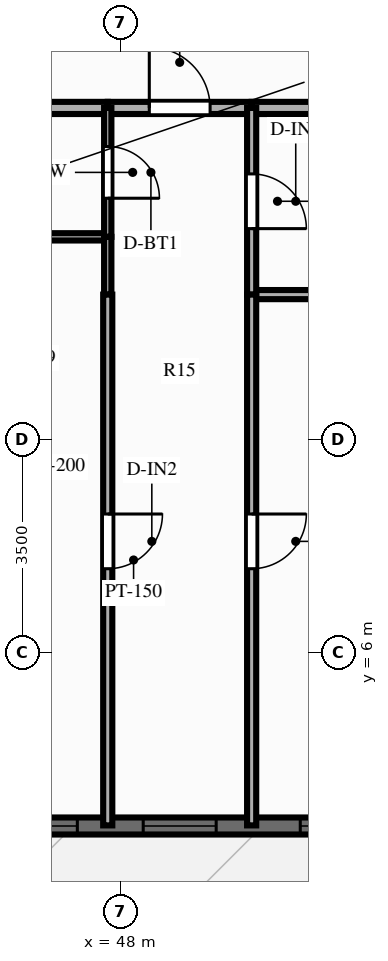
"""IFC4 building model, lengths in metres.
Left out: names, types, materials, properties, quantities, classifications, styles, units other than length and angle.
Written with IfcOpenShell. Run it as: python <this file> out.ifc"""

import sys

from ifc_helpers import new_model, si_unit, direction, frame, frame_2d, origin, place, context, subcontext, project, spatial, rectangle, extrude, source, transform, mapped, element, fill, save


model = new_model("IFC4")
c1 = context("Model", 3, precision=1e-05, world=origin(), true_north=direction((0.0, 1.0)))
c2 = subcontext(c1, "Body", "Model", "MODEL_VIEW")
j1 = project(units=[si_unit("LENGTHUNIT", "METRE"), si_unit("PLANEANGLEUNIT", "RADIAN")], contexts=[c1])
p1 = place(None, origin())
s1 = spatial("IfcSite", under=j1, at=p1, CompositionType="ELEMENT")
p2 = place(p1, origin())
s2 = spatial("IfcBuilding", under=s1, at=p2, CompositionType="ELEMENT")
p3 = place(p2, frame((0.0, 0.0, 19.4)))
s3 = spatial("IfcBuildingStorey", under=s2, at=p3, CompositionType="ELEMENT", Elevation=19.4)
p4 = place(p3, frame((15.5, 3.14, 0.0), z_axis=(0.0, 0.0, 1.0), x_axis=(1.0, 0.0, 0.0)))
e1 = element("IfcWall", 1, at=p4, inside=s3, PredefinedType="SOLIDWALL", context=c2, shape_type="SweptSolid", body=[
    extrude(rectangle(XDim=45.0, YDim=0.28, at=frame_2d((22.5, 0.0))), origin(), (0.0, 0.0, 1.0), 2.28),
])
p5 = place(p4, frame((0.785, 0.0, 0.25)))
e2 = element("IfcOpeningElement", 2, at=p5, cuts=e1, PredefinedType="OPENING", context=c2, shape_type="SweptSolid", body=[
    extrude(rectangle(XDim=1.2, YDim=1.5, at=frame_2d((0.6, 0.75))), frame((0.0, 0.152, 0.0), z_axis=(0.0, -1.0, 0.0), x_axis=(1.0, 0.0, 0.0)), (0.0, 0.0, 1.0), 0.304),
])
p6 = place(p4, frame((3.033, 0.0, 0.25)))
e3 = element("IfcOpeningElement", 3, at=p6, cuts=e1, PredefinedType="OPENING", context=c2, shape_type="SweptSolid", body=[
    extrude(rectangle(XDim=1.2, YDim=1.5, at=frame_2d((0.6, 0.75))), frame((0.0, 0.152, 0.0), z_axis=(0.0, -1.0, 0.0), x_axis=(1.0, 0.0, 0.0)), (0.0, 0.0, 1.0), 0.304),
])
p7 = place(p4, frame((5.727, 0.0, 0.25)))
e4 = element("IfcOpeningElement", 4, at=p7, cuts=e1, PredefinedType="OPENING", context=c2, shape_type="SweptSolid", body=[
    extrude(rectangle(XDim=1.2, YDim=1.5, at=frame_2d((0.6, 0.75))), frame((0.0, 0.152, 0.0), z_axis=(0.0, -1.0, 0.0), x_axis=(1.0, 0.0, 0.0)), (0.0, 0.0, 1.0), 0.304),
])
p8 = place(p4, frame((8.269, 0.0, 0.25)))
e5 = element("IfcOpeningElement", 5, at=p8, cuts=e1, PredefinedType="OPENING", context=c2, shape_type="SweptSolid", body=[
    extrude(rectangle(XDim=1.2, YDim=1.5, at=frame_2d((0.6, 0.75))), frame((0.0, 0.152, 0.0), z_axis=(0.0, -1.0, 0.0), x_axis=(1.0, 0.0, 0.0)), (0.0, 0.0, 1.0), 0.304),
])
p9 = place(p4, frame((10.621, 0.0, 0.25)))
e6 = element("IfcOpeningElement", 6, at=p9, cuts=e1, PredefinedType="OPENING", context=c2, shape_type="SweptSolid", body=[
    extrude(rectangle(XDim=1.2, YDim=1.5, at=frame_2d((0.6, 0.75))), frame((0.0, 0.152, 0.0), z_axis=(0.0, -1.0, 0.0), x_axis=(1.0, 0.0, 0.0)), (0.0, 0.0, 1.0), 0.304),
])
p10 = place(p4, frame((13.316, 0.0, 0.25)))
e7 = element("IfcOpeningElement", 7, at=p10, cuts=e1, PredefinedType="OPENING", context=c2, shape_type="SweptSolid", body=[
    extrude(rectangle(XDim=1.2, YDim=1.5, at=frame_2d((0.6, 0.75))), frame((0.0, 0.152, 0.0), z_axis=(0.0, -1.0, 0.0), x_axis=(1.0, 0.0, 0.0)), (0.0, 0.0, 1.0), 0.304),
])
p11 = place(p4, frame((16.624, 0.0, 0.25)))
e8 = element("IfcOpeningElement", 8, at=p11, cuts=e1, PredefinedType="OPENING", context=c2, shape_type="SweptSolid", body=[
    extrude(rectangle(XDim=0.7, YDim=1.5, at=frame_2d((0.35, 0.75))), frame((0.0, 0.152, 0.0), z_axis=(0.0, -1.0, 0.0), x_axis=(1.0, 0.0, 0.0)), (0.0, 0.0, 1.0), 0.304),
])
p12 = place(p4, frame((18.141, 0.0, 0.25)))
e9 = element("IfcOpeningElement", 9, at=p12, cuts=e1, PredefinedType="OPENING", context=c2, shape_type="SweptSolid", body=[
    extrude(rectangle(XDim=1.2, YDim=1.5, at=frame_2d((0.6, 0.75))), frame((0.0, 0.152, 0.0), z_axis=(0.0, -1.0, 0.0), x_axis=(1.0, 0.0, 0.0)), (0.0, 0.0, 1.0), 0.304),
])
p13 = place(p4, frame((21.874, 0.0, 0.0), z_axis=(0.0, 0.0, 1.0), x_axis=(-1.0, 0.0, 0.0)))
e10 = element("IfcOpeningElement", 10, at=p13, cuts=e1, PredefinedType="OPENING", context=c2, shape_type="SweptSolid", body=[
    extrude(rectangle(XDim=1.1, YDim=2.15, at=frame_2d((0.55, 1.075))), frame((0.0, 0.152, 0.0), z_axis=(0.0, -1.0, 0.0), x_axis=(1.0, 0.0, 0.0)), (0.0, 0.0, 1.0), 0.304),
])
p14 = place(p4, frame((23.223, 0.0, 0.25)))
e11 = element("IfcOpeningElement", 11, at=p14, cuts=e1, PredefinedType="OPENING", context=c2, shape_type="SweptSolid", body=[
    extrude(rectangle(XDim=1.2, YDim=1.5, at=frame_2d((0.6, 0.75))), frame((0.0, 0.152, 0.0), z_axis=(0.0, -1.0, 0.0), x_axis=(1.0, 0.0, 0.0)), (0.0, 0.0, 1.0), 0.304),
])
p15 = place(p4, frame((25.507, 0.0, 0.25)))
e12 = element("IfcOpeningElement", 12, at=p15, cuts=e1, PredefinedType="OPENING", context=c2, shape_type="SweptSolid", body=[
    extrude(rectangle(XDim=1.2, YDim=1.5, at=frame_2d((0.6, 0.75))), frame((0.0, 0.152, 0.0), z_axis=(0.0, -1.0, 0.0), x_axis=(1.0, 0.0, 0.0)), (0.0, 0.0, 1.0), 0.304),
])
p16 = place(p4, frame((27.6, 0.0, 0.25)))
e13 = element("IfcOpeningElement", 13, at=p16, cuts=e1, PredefinedType="OPENING", context=c2, shape_type="SweptSolid", body=[
    extrude(rectangle(XDim=0.7, YDim=1.5, at=frame_2d((0.35, 0.75))), frame((0.0, 0.152, 0.0), z_axis=(0.0, -1.0, 0.0), x_axis=(1.0, 0.0, 0.0)), (0.0, 0.0, 1.0), 0.304),
])
p17 = place(p4, frame((30.589, 0.0, 0.25)))
e14 = element("IfcOpeningElement", 14, at=p17, cuts=e1, PredefinedType="OPENING", context=c2, shape_type="SweptSolid", body=[
    extrude(rectangle(XDim=1.2, YDim=1.5, at=frame_2d((0.6, 0.75))), frame((0.0, 0.152, 0.0), z_axis=(0.0, -1.0, 0.0), x_axis=(1.0, 0.0, 0.0)), (0.0, 0.0, 1.0), 0.304),
])
p18 = place(p4, frame((32.872, 0.0, 0.25)))
e15 = element("IfcOpeningElement", 15, at=p18, cuts=e1, PredefinedType="OPENING", context=c2, shape_type="SweptSolid", body=[
    extrude(rectangle(XDim=1.2, YDim=1.5, at=frame_2d((0.6, 0.75))), frame((0.0, 0.152, 0.0), z_axis=(0.0, -1.0, 0.0), x_axis=(1.0, 0.0, 0.0)), (0.0, 0.0, 1.0), 0.304),
])
p19 = place(p4, frame((35.455, 0.0, 0.25)))
e16 = element("IfcOpeningElement", 16, at=p19, cuts=e1, PredefinedType="OPENING", context=c2, shape_type="SweptSolid", body=[
    extrude(rectangle(XDim=1.2, YDim=1.5, at=frame_2d((0.6, 0.75))), frame((0.0, 0.152, 0.0), z_axis=(0.0, -1.0, 0.0), x_axis=(1.0, 0.0, 0.0)), (0.0, 0.0, 1.0), 0.304),
])
p20 = place(p4, frame((37.954, 0.0, 0.25)))
e17 = element("IfcOpeningElement", 17, at=p20, cuts=e1, PredefinedType="OPENING", context=c2, shape_type="SweptSolid", body=[
    extrude(rectangle(XDim=1.2, YDim=1.5, at=frame_2d((0.6, 0.75))), frame((0.0, 0.152, 0.0), z_axis=(0.0, -1.0, 0.0), x_axis=(1.0, 0.0, 0.0)), (0.0, 0.0, 1.0), 0.304),
])
p21 = place(p4, frame((40.238, 0.0, 0.25)))
e18 = element("IfcOpeningElement", 18, at=p21, cuts=e1, PredefinedType="OPENING", context=c2, shape_type="SweptSolid", body=[
    extrude(rectangle(XDim=1.2, YDim=1.5, at=frame_2d((0.6, 0.75))), frame((0.0, 0.152, 0.0), z_axis=(0.0, -1.0, 0.0), x_axis=(1.0, 0.0, 0.0)), (0.0, 0.0, 1.0), 0.304),
])
p22 = place(p4, frame((42.716, 0.0, 0.25)))
e19 = element("IfcOpeningElement", 19, at=p22, cuts=e1, PredefinedType="OPENING", context=c2, shape_type="SweptSolid", body=[
    extrude(rectangle(XDim=1.2, YDim=1.5, at=frame_2d((0.6, 0.75))), frame((0.0, 0.152, 0.0), z_axis=(0.0, -1.0, 0.0), x_axis=(1.0, 0.0, 0.0)), (0.0, 0.0, 1.0), 0.304),
])
p23 = place(p3, frame((45.589, 14.95, 0.0), z_axis=(0.0, 0.0, 1.0), x_axis=(1.0, 0.0, 0.0)))
e20 = element("IfcWall", 20, at=p23, inside=s3, PredefinedType="PARTITIONING", context=c2, shape_type="SweptSolid", body=[
    extrude(rectangle(XDim=2.2, YDim=0.2, at=frame_2d((1.1, 0.0))), origin(), (0.0, 0.0, 1.0), 2.79),
])
p24 = place(p3, frame((47.789, 14.95, 0.0), z_axis=(0.0, 0.0, 1.0), x_axis=(1.0, 0.0, 0.0)))
e21 = element("IfcWall", 21, at=p24, inside=s3, PredefinedType="PARTITIONING", context=c2, shape_type="SweptSolid", body=[
    extrude(rectangle(XDim=2.367, YDim=0.2, at=frame_2d((1.183, 0.0))), origin(), (0.0, 0.0, 1.0), 2.79),
])
p25 = place(p24, frame((0.683, 0.0, 0.0)))
e22 = element("IfcOpeningElement", 22, at=p25, cuts=e21, PredefinedType="OPENING", context=c2, shape_type="SweptSolid", body=[
    extrude(rectangle(XDim=1.0, YDim=2.15, at=frame_2d((0.5, 1.075))), frame((0.0, 0.112, 0.0), z_axis=(0.0, -1.0, 0.0), x_axis=(1.0, 0.0, 0.0)), (0.0, 0.0, 1.0), 0.224),
])
p26 = place(p3, frame((50.156, 14.95, 0.0), z_axis=(0.0, 0.0, 1.0), x_axis=(1.0, 0.0, 0.0)))
e23 = element("IfcWall", 23, at=p26, inside=s3, PredefinedType="PARTITIONING", context=c2, shape_type="SweptSolid", body=[
    extrude(rectangle(XDim=2.799, YDim=0.2, at=frame_2d((1.399, 0.0))), origin(), (0.0, 0.0, 1.0), 2.79),
])
p27 = place(p3, frame((45.589, 12.83, 0.0), z_axis=(0.0, 0.0, 1.0), x_axis=(1.0, 0.0, 0.0)))
e24 = element("IfcWall", 24, at=p27, inside=s3, PredefinedType="PARTITIONING", context=c2, shape_type="SweptSolid", body=[
    extrude(rectangle(XDim=2.2, YDim=0.12, at=frame_2d((1.1, 0.0))), origin(), (0.0, 0.0, 1.0), 2.79),
])
p28 = place(p3, frame((50.156, 11.88, 0.0), z_axis=(0.0, 0.0, 1.0), x_axis=(1.0, 0.0, 0.0)))
e25 = element("IfcWall", 25, at=p28, inside=s3, PredefinedType="PARTITIONING", context=c2, shape_type="SweptSolid", body=[
    extrude(rectangle(XDim=2.799, YDim=0.15, at=frame_2d((1.399, 0.0))), origin(), (0.0, 0.0, 1.0), 2.79),
])
p29 = place(p3, frame((47.789, 14.95, 0.0), z_axis=(0.0, 0.0, 1.0), x_axis=(0.0, -1.0, 0.0)))
e26 = element("IfcWall", 26, at=p29, inside=s3, PredefinedType="PARTITIONING", context=c2, shape_type="SweptSolid", body=[
    extrude(rectangle(XDim=2.12, YDim=0.12, at=frame_2d((1.06, 0.0))), origin(), (0.0, 0.0, 1.0), 2.79),
])
p30 = place(p29, frame((0.635, 0.0, 0.0)))
e27 = element("IfcOpeningElement", 27, at=p30, cuts=e26, PredefinedType="OPENING", context=c2, shape_type="SweptSolid", body=[
    extrude(rectangle(XDim=0.85, YDim=2.05, at=frame_2d((0.425, 1.025))), frame((0.0, 0.072, 0.0), z_axis=(0.0, -1.0, 0.0), x_axis=(1.0, 0.0, 0.0)), (0.0, 0.0, 1.0), 0.144),
])
p31 = place(p3, frame((47.789, 12.83, 0.0), z_axis=(0.0, 0.0, 1.0), x_axis=(0.0, -1.0, 0.0)))
e28 = element("IfcWall", 28, at=p31, inside=s3, PredefinedType="PARTITIONING", context=c2, shape_type="SweptSolid", body=[
    extrude(rectangle(XDim=0.95, YDim=0.12, at=frame_2d((0.475, 0.0))), origin(), (0.0, 0.0, 1.0), 2.79),
])
p32 = place(p3, frame((47.789, 11.88, 0.0), z_axis=(0.0, 0.0, 1.0), x_axis=(0.0, -1.0, 0.0)))
e29 = element("IfcWall", 29, at=p32, inside=s3, PredefinedType="PARTITIONING", context=c2, shape_type="SweptSolid", body=[
    extrude(rectangle(XDim=8.73, YDim=0.15, at=frame_2d((4.365, 0.0))), origin(), (0.0, 0.0, 1.0), 2.79),
])
p33 = place(p32, frame((3.609, 0.0, 0.0)))
e30 = element("IfcOpeningElement", 30, at=p33, cuts=e29, PredefinedType="OPENING", context=c2, shape_type="SweptSolid", body=[
    extrude(rectangle(XDim=0.9, YDim=2.1, at=frame_2d((0.45, 1.05))), frame((0.0, 0.087, 0.0), z_axis=(0.0, -1.0, 0.0), x_axis=(1.0, 0.0, 0.0)), (0.0, 0.0, 1.0), 0.174),
])
p34 = place(p3, frame((50.156, 14.95, 0.0), z_axis=(0.0, 0.0, 1.0), x_axis=(0.0, -1.0, 0.0)))
e31 = element("IfcWall", 31, at=p34, inside=s3, PredefinedType="PARTITIONING", context=c2, shape_type="SweptSolid", body=[
    extrude(rectangle(XDim=3.07, YDim=0.15, at=frame_2d((1.535, 0.0))), origin(), (0.0, 0.0, 1.0), 2.79),
])
p35 = place(p34, frame((1.085, 0.0, 0.0)))
e32 = element("IfcOpeningElement", 32, at=p35, cuts=e31, PredefinedType="OPENING", context=c2, shape_type="SweptSolid", body=[
    extrude(rectangle(XDim=0.9, YDim=2.1, at=frame_2d((0.45, 1.05))), frame((0.0, 0.087, 0.0), z_axis=(0.0, -1.0, 0.0), x_axis=(1.0, 0.0, 0.0)), (0.0, 0.0, 1.0), 0.174),
])
p36 = place(p3, frame((50.156, 11.88, 0.0), z_axis=(0.0, 0.0, 1.0), x_axis=(0.0, -1.0, 0.0)))
e33 = element("IfcWall", 33, at=p36, inside=s3, PredefinedType="PARTITIONING", context=c2, shape_type="SweptSolid", body=[
    extrude(rectangle(XDim=8.73, YDim=0.15, at=frame_2d((4.365, 0.0))), origin(), (0.0, 0.0, 1.0), 2.79),
])
p37 = place(p36, frame((3.609, 0.0, 0.0)))
e34 = element("IfcOpeningElement", 34, at=p37, cuts=e33, PredefinedType="OPENING", context=c2, shape_type="SweptSolid", body=[
    extrude(rectangle(XDim=0.9, YDim=2.1, at=frame_2d((0.45, 1.05))), frame((0.0, 0.087, 0.0), z_axis=(0.0, -1.0, 0.0), x_axis=(1.0, 0.0, 0.0)), (0.0, 0.0, 1.0), 0.174),
])
m1 = source(origin(), c2, "Body", "SweptSolid", [
    extrude(rectangle(XDim=1.2, YDim=1.5, at=frame_2d((0.6, 0.75))), frame((0.0, 0.03, 0.0), z_axis=(0.0, -1.0, 0.0), x_axis=(1.0, 0.0, 0.0)), (0.0, 0.0, 1.0), 0.06),
])
p38 = place(p17, origin())
e35 = element("IfcWindow", 35, at=p38, inside=s3, PartitioningType="SINGLE_PANEL", PredefinedType="WINDOW", context=c2, shape_type="MappedRepresentation", body=[
    mapped(m1, transform((0.0, 0.0, 0.0), scale=1.0)),
])
fill(e14, e35)
p39 = place(p18, origin())
e36 = element("IfcWindow", 36, at=p39, inside=s3, PartitioningType="SINGLE_PANEL", PredefinedType="WINDOW", context=c2, shape_type="MappedRepresentation", body=[
    mapped(m1, transform((0.0, 0.0, 0.0), scale=1.0)),
])
fill(e15, e36)
p40 = place(p19, origin())
e37 = element("IfcWindow", 37, at=p40, inside=s3, PartitioningType="SINGLE_PANEL", PredefinedType="WINDOW", context=c2, shape_type="MappedRepresentation", body=[
    mapped(m1, transform((0.0, 0.0, 0.0), scale=1.0)),
])
fill(e16, e37)
m2 = source(origin(), c2, "Body", "SweptSolid", [
    extrude(rectangle(XDim=1.0, YDim=2.15, at=frame_2d((0.5, 1.075))), frame((0.0, 0.025, 0.0), z_axis=(0.0, -1.0, 0.0), x_axis=(1.0, 0.0, 0.0)), (0.0, 0.0, 1.0), 0.05),
])
p41 = place(p25, origin())
e38 = element("IfcDoor", 38, at=p41, inside=s3, OperationType="SINGLE_SWING_LEFT", PredefinedType="DOOR", context=c2, shape_type="MappedRepresentation", body=[
    mapped(m2, transform((0.0, 0.0, 0.0), scale=1.0)),
])
fill(e22, e38)
m3 = source(origin(), c2, "Body", "SweptSolid", [
    extrude(rectangle(XDim=0.85, YDim=2.05, at=frame_2d((0.425, 1.025))), frame((0.0, 0.025, 0.0), z_axis=(0.0, -1.0, 0.0), x_axis=(1.0, 0.0, 0.0)), (0.0, 0.0, 1.0), 0.05),
])
p42 = place(p30, origin())
e39 = element("IfcDoor", 39, at=p42, inside=s3, OperationType="SINGLE_SWING_RIGHT", PredefinedType="DOOR", context=c2, shape_type="MappedRepresentation", body=[
    mapped(m3, transform((0.0, 0.0, 0.0), scale=1.0)),
])
fill(e27, e39)
m4 = source(origin(), c2, "Body", "SweptSolid", [
    extrude(rectangle(XDim=0.9, YDim=2.1, at=frame_2d((0.45, 1.05))), frame((0.0, 0.025, 0.0), z_axis=(0.0, -1.0, 0.0), x_axis=(1.0, 0.0, 0.0)), (0.0, 0.0, 1.0), 0.05),
])
p43 = place(p33, origin())
e40 = element("IfcDoor", 40, at=p43, inside=s3, OperationType="SINGLE_SWING_LEFT", PredefinedType="DOOR", context=c2, shape_type="MappedRepresentation", body=[
    mapped(m4, transform((0.0, 0.0, 0.0), scale=1.0)),
])
fill(e30, e40)
p44 = place(p35, origin())
e41 = element("IfcDoor", 41, at=p44, inside=s3, OperationType="SINGLE_SWING_RIGHT", PredefinedType="DOOR", context=c2, shape_type="MappedRepresentation", body=[
    mapped(m4, transform((0.0, 0.0, 0.0), scale=1.0)),
])
fill(e32, e41)
p45 = place(p37, origin())
e42 = element("IfcDoor", 42, at=p45, inside=s3, OperationType="SINGLE_SWING_LEFT", PredefinedType="DOOR", context=c2, shape_type="MappedRepresentation", body=[
    mapped(m4, transform((0.0, 0.0, 0.0), scale=1.0)),
])
fill(e34, e42)
save(model, sys.argv[1])
